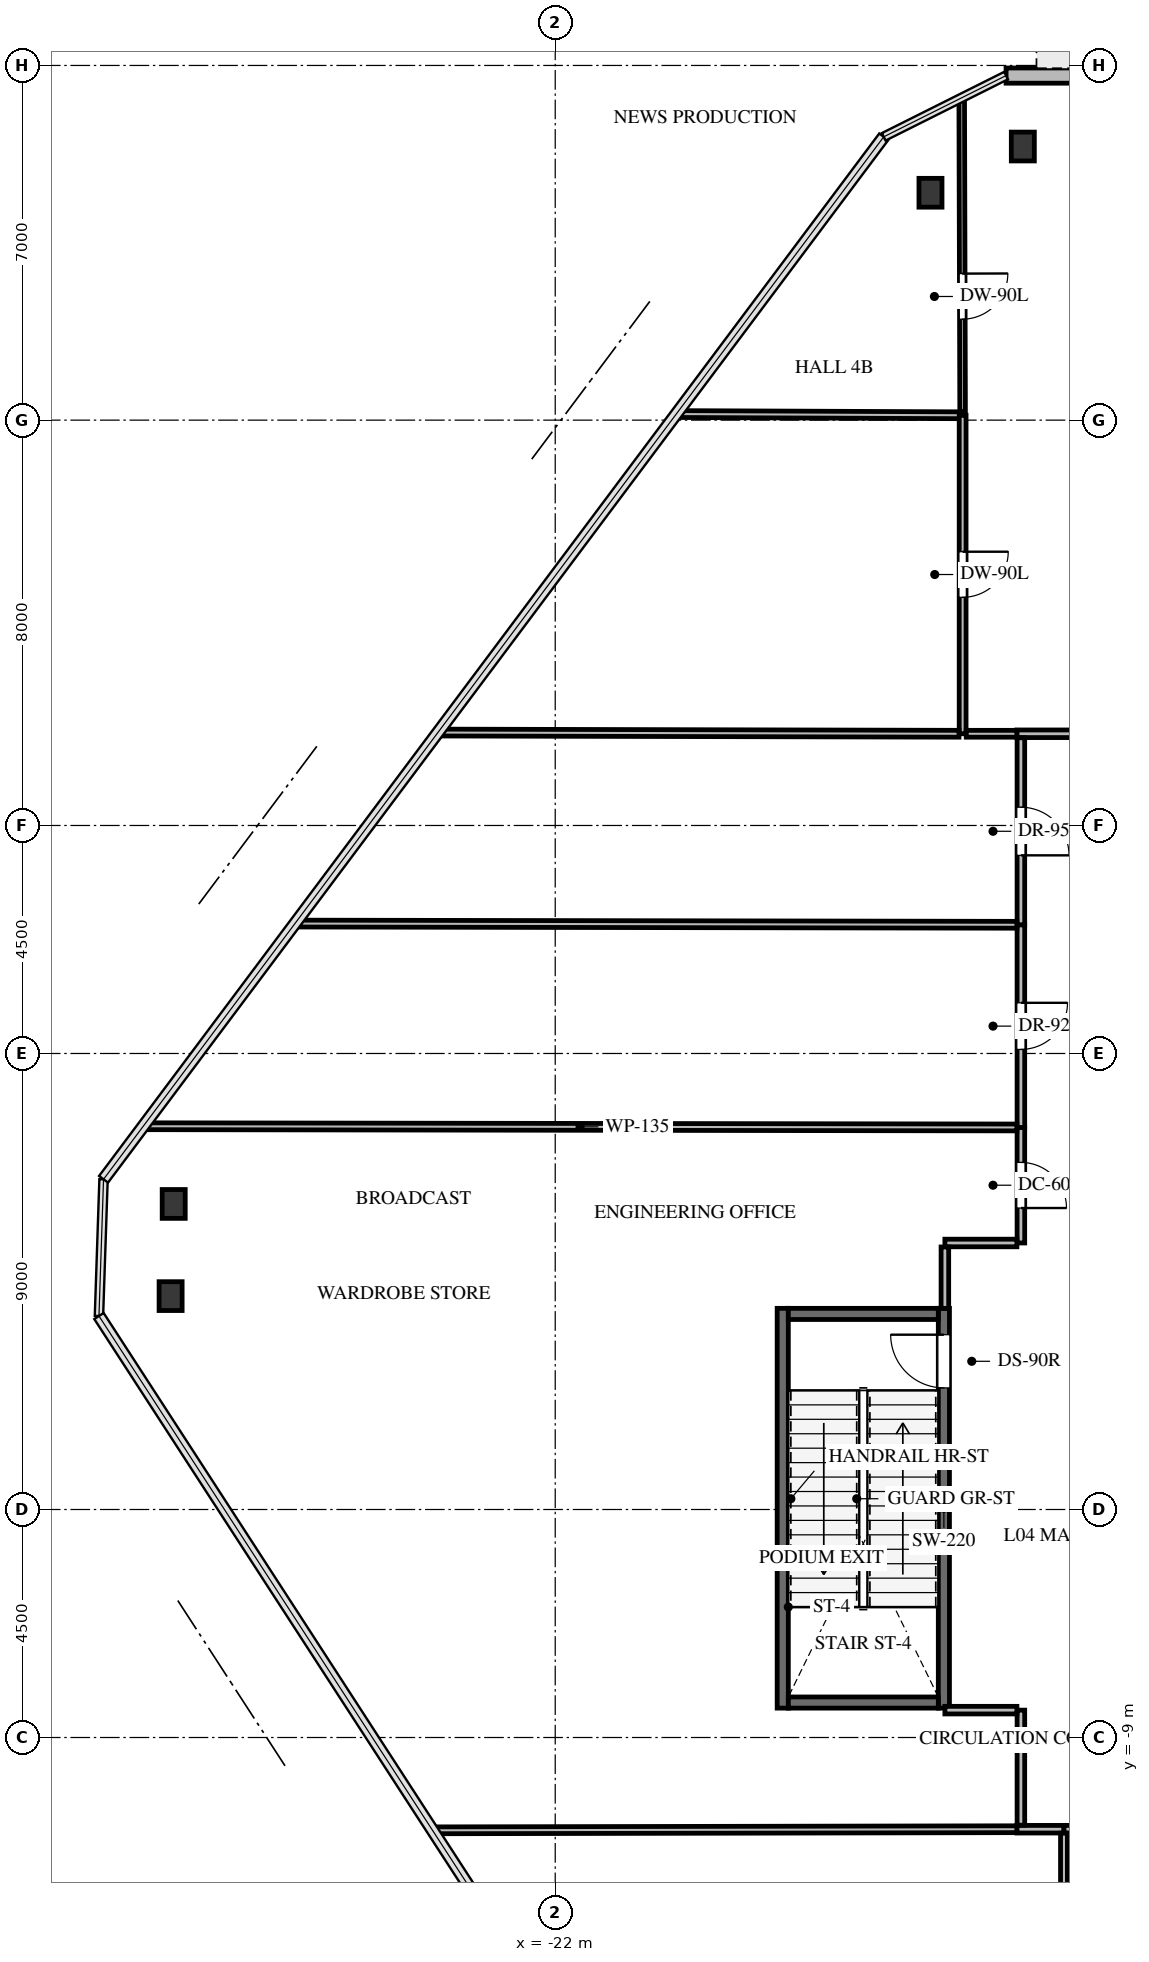
"""IFC4 building model, lengths in metres.
Left out: names, types, materials, properties, quantities, classifications, styles, units other than length and angle.
Written with IfcOpenShell. Run it as: python <this file> out.ifc"""

import sys

from ifc_helpers import new_model, si_unit, direction, frame, frame_2d, origin, origin_2d, place, context, subcontext, project, spatial, rectangle, i_section, extrude, source, transform, mapped, element, fill, save


model = new_model("IFC4")
c1 = context("Model", 3, precision=1e-05, world=origin(), true_north=direction((0.0, 1.0)))
c2 = subcontext(c1, "Body", "Model", "MODEL_VIEW")
j1 = project(units=[si_unit("LENGTHUNIT", "METRE"), si_unit("PLANEANGLEUNIT", "RADIAN")], contexts=[c1])
p1 = place(None, origin())
s1 = spatial("IfcSite", under=j1, at=p1, CompositionType="ELEMENT")
p2 = place(p1, origin())
s2 = spatial("IfcBuilding", under=s1, at=p2, CompositionType="ELEMENT")
p3 = place(p2, frame((0.0, 0.0, 21.2)))
s3 = spatial("IfcBuildingStorey", under=s2, at=p3, CompositionType="ELEMENT", Elevation=21.2)
p4 = place(p3, frame((-14.33, -8.42, -0.32), z_axis=(0.0, 0.0, 1.0), x_axis=(0.0, 1.0, 0.0)))
e1 = element("IfcWall", 1, at=p4, inside=s3, PredefinedType="SHEAR", context=c2, shape_type="SweptSolid", body=[
    extrude(rectangle(XDim=7.89, YDim=0.22, at=frame_2d((3.945, 0.0))), origin(), (0.0, 0.0, 1.0), 5.6),
])
p5 = place(p4, frame((6.32, 0.0, 0.0)))
e2 = element("IfcOpeningElement", 2, at=p5, cuts=e1, PredefinedType="OPENING", context=c2, shape_type="SweptSolid", body=[
    extrude(rectangle(XDim=1.05, YDim=2.15, at=frame_2d((0.525, 1.075))), frame((0.0, 0.12, 0.0), z_axis=(0.0, -1.0, 0.0), x_axis=(1.0, 0.0, 0.0)), (0.0, 0.0, 1.0), 0.24),
])
p6 = place(p3, frame((-17.51, -0.53, -0.32), z_axis=(0.0, 0.0, 1.0), x_axis=(0.0, -1.0, 0.0)))
e3 = element("IfcWall", 3, at=p6, inside=s3, PredefinedType="SHEAR", context=c2, shape_type="SweptSolid", body=[
    extrude(rectangle(XDim=7.89, YDim=0.22, at=frame_2d((3.945, 0.0))), origin(), (0.0, 0.0, 1.0), 5.6),
])
for number, where, z_axis, x_axis in (
    (4, (-17.4, -8.31, -0.32), (0.0, 0.0, 1.0), (1.0, 0.0, 0.0)),
    (5, (-14.44, -0.64, -0.32), (0.0, 0.0, 1.0), (-1.0, 0.0, 0.0)),
):
    element("IfcWall", number, at=place(p3, frame(where, z_axis=z_axis, x_axis=x_axis)), inside=s3, PredefinedType="SHEAR", context=c2, shape_type="SweptSolid", body=[
        extrude(rectangle(XDim=2.96, YDim=0.22, at=frame_2d((1.48, 0.0))), origin(), (0.0, 0.0, 1.0), 5.6),
    ])
m1 = source(origin(), c2, "Body", "SweptSolid", [
    extrude(i_section(OverallWidth=0.454, OverallDepth=0.569, WebThickness=0.078, FlangeThickness=0.125, FilletRadius=0.031, at=origin_2d()), origin(), (0.0, 0.0, 1.0), 5.6),
])
for number, where, z_axis, x_axis in (
    (6, (-29.591, -0.289, -0.32), (0.0, 0.0, 1.0), (1.0, 0.0, 0.0)),
    (7, (-29.529, 1.531, -0.32), (0.0, 0.0, 1.0), (1.0, 0.0, 0.0)),
    (8, (-14.594, 21.488, -0.32), (0.0, 0.0, 1.0), (1.0, 0.0, 0.0)),
    (9, (-12.772, 22.4, -0.32), (0.0, 0.0, 1.0), (1.0, 0.0, 0.0)),
):
    element("IfcColumn", number, at=place(p3, frame(where, z_axis=z_axis, x_axis=x_axis)), inside=s3, PredefinedType="COLUMN", context=c2, shape_type="MappedRepresentation", body=[
        mapped(m1, transform((0.0, 0.0, 0.0), x_axis=(1.0, 0.0, 0.0), y_axis=(0.0, 1.0, 0.0), z_axis=(0.0, 0.0, 1.0), scale=1.0)),
    ])
p7 = place(p3, frame((-13.103, 23.8, 0.0), z_axis=(0.0, 0.0, 1.0), x_axis=(1.0, 0.0, 0.0)))
e10 = element("IfcWall", 10, at=p7, inside=s3, PredefinedType="SOLIDWALL", context=c2, shape_type="SweptSolid", body=[
    extrude(rectangle(XDim=27.578, YDim=0.3, at=frame_2d((13.789, 0.0))), origin(), (0.0, 0.0, 1.0), 5.28),
])
p8 = place(p7, frame((3.0, 0.0, 1.0)))
e11 = element("IfcOpeningElement", 11, at=p8, cuts=e10, PredefinedType="OPENING", context=c2, shape_type="SweptSolid", body=[
    extrude(rectangle(XDim=1.8, YDim=2.1, at=frame_2d((0.9, 1.05))), frame((0.0, 0.16, 0.0), z_axis=(0.0, -1.0, 0.0), x_axis=(1.0, 0.0, 0.0)), (0.0, 0.0, 1.0), 0.32),
])
p9 = place(p7, frame((22.778, 0.0, 1.0)))
e12 = element("IfcOpeningElement", 12, at=p9, cuts=e10, PredefinedType="OPENING", context=c2, shape_type="SweptSolid", body=[
    extrude(rectangle(XDim=1.8, YDim=2.1, at=frame_2d((0.9, 1.05))), frame((0.0, 0.16, 0.0), z_axis=(0.0, -1.0, 0.0), x_axis=(1.0, 0.0, 0.0)), (0.0, 0.0, 1.0), 0.32),
])
p10 = place(p3, frame((-1.96, 10.81, 0.0), z_axis=(0.0, 0.0, 1.0), x_axis=(-1.0, 0.0, 0.0)))
e13 = element("IfcWall", 13, at=p10, inside=s3, PredefinedType="PARTITIONING", context=c2, shape_type="SweptSolid", body=[
    extrude(rectangle(XDim=10.93, YDim=0.15, at=frame_2d((5.465, 0.0))), origin(), (0.0, 0.0, 1.0), 4.285),
])
p11 = place(p10, frame((5.005, 0.0, 0.0)))
e14 = element("IfcOpeningElement", 14, at=p11, cuts=e13, PredefinedType="OPENING", context=c2, shape_type="SweptSolid", body=[
    extrude(rectangle(XDim=0.92, YDim=2.1, at=frame_2d((0.46, 1.05))), frame((0.0, 0.085, 0.0), z_axis=(0.0, -1.0, 0.0), x_axis=(1.0, 0.0, 0.0)), (0.0, 0.0, 1.0), 0.17),
])
p12 = place(p3, frame((-12.89, -10.81, 0.0), z_axis=(0.0, 0.0, 1.0), x_axis=(1.0, 0.0, 0.0)))
e15 = element("IfcWall", 15, at=p12, inside=s3, PredefinedType="PARTITIONING", context=c2, shape_type="SweptSolid", body=[
    extrude(rectangle(XDim=0.93, YDim=0.15, at=frame_2d((0.465, 0.0))), origin(), (0.0, 0.0, 1.0), 4.285),
])
p13 = place(p3, frame((-11.96, -10.81, 0.0), z_axis=(0.0, 0.0, 1.0), x_axis=(1.0, 0.0, 0.0)))
e16 = element("IfcWall", 16, at=p13, inside=s3, PredefinedType="PARTITIONING", context=c2, shape_type="SweptSolid", body=[
    extrude(rectangle(XDim=12.0, YDim=0.15, at=frame_2d((6.0, 0.0))), origin(), (0.0, 0.0, 1.0), 4.285),
])
p14 = place(p13, frame((5.54, 0.0, 0.0)))
e17 = element("IfcOpeningElement", 17, at=p14, cuts=e16, PredefinedType="OPENING", context=c2, shape_type="SweptSolid", body=[
    extrude(rectangle(XDim=0.92, YDim=2.1, at=frame_2d((0.46, 1.05))), frame((0.0, 0.085, 0.0), z_axis=(0.0, -1.0, 0.0), x_axis=(1.0, 0.0, 0.0)), (0.0, 0.0, 1.0), 0.17),
])
p15 = place(p3, frame((-12.81, -8.46, 0.0), z_axis=(0.0, 0.0, 1.0), x_axis=(0.0, -1.0, 0.0)))
e18 = element("IfcWall", 18, at=p15, inside=s3, PredefinedType="PARTITIONING", context=c2, shape_type="SweptSolid", body=[
    extrude(rectangle(XDim=2.271, YDim=0.15, at=frame_2d((1.135, 0.0))), origin(), (0.0, 0.0, 1.0), 5.265),
])
p16 = place(p3, frame((-12.81, 3.04, 0.0), z_axis=(0.0, 0.0, 1.0), x_axis=(0.0, -1.0, 0.0)))
e19 = element("IfcWall", 19, at=p16, inside=s3, PredefinedType="PARTITIONING", context=c2, shape_type="SweptSolid", body=[
    extrude(rectangle(XDim=2.28, YDim=0.15, at=frame_2d((1.14, 0.0))), origin(), (0.0, 0.0, 1.0), 4.285),
])
p17 = place(p16, frame((0.69, 0.0, 0.0)))
e20 = element("IfcOpeningElement", 20, at=p17, cuts=e19, PredefinedType="OPENING", context=c2, shape_type="SweptSolid", body=[
    extrude(rectangle(XDim=0.9, YDim=2.05, at=frame_2d((0.45, 1.025))), frame((0.0, 0.085, 0.0), z_axis=(0.0, -1.0, 0.0), x_axis=(1.0, 0.0, 0.0)), (0.0, 0.0, 1.0), 0.17),
])
for number, where, z_axis, x_axis in (
    (21, (-12.889, 0.76, 0.0), (0.0, 0.0, 1.0), (-1.0, 0.0, 0.0)),
    (22, (-14.31, -8.46, 0.0), (0.0, 0.0, 1.0), (1.0, 0.0, 0.0)),
):
    element("IfcWall", number, at=place(p3, frame(where, z_axis=z_axis, x_axis=x_axis)), inside=s3, PredefinedType="PARTITIONING", context=c2, shape_type="SweptSolid", body=[
        extrude(rectangle(XDim=1.421, YDim=0.15, at=frame_2d((0.71, 0.0))), origin(), (0.0, 0.0, 1.0), 5.265),
    ])
p18 = place(p3, frame((-14.31, 0.681, 0.0), z_axis=(0.0, 0.0, 1.0), x_axis=(0.0, -1.0, 0.0)))
e23 = element("IfcWall", 23, at=p18, inside=s3, PredefinedType="PARTITIONING", context=c2, shape_type="SweptSolid", body=[
    extrude(rectangle(XDim=1.211, YDim=0.15, at=frame_2d((0.605, 0.0))), origin(), (0.0, 0.0, 1.0), 5.265),
])
p19 = place(p3, frame((-12.81, 7.04, 0.0), z_axis=(0.0, 0.0, 1.0), x_axis=(0.0, -1.0, 0.0)))
e24 = element("IfcWall", 24, at=p19, inside=s3, PredefinedType="PARTITIONING", context=c2, shape_type="SweptSolid", body=[
    extrude(rectangle(XDim=4.0, YDim=0.15, at=frame_2d((2.0, 0.0))), origin(), (0.0, 0.0, 1.0), 5.265),
])
p20 = place(p19, frame((1.54, 0.0, 0.0)))
e25 = element("IfcOpeningElement", 25, at=p20, cuts=e24, PredefinedType="OPENING", context=c2, shape_type="SweptSolid", body=[
    extrude(rectangle(XDim=0.92, YDim=2.1, at=frame_2d((0.46, 1.05))), frame((0.0, 0.085, 0.0), z_axis=(0.0, -1.0, 0.0), x_axis=(1.0, 0.0, 0.0)), (0.0, 0.0, 1.0), 0.17),
])
p21 = place(p3, frame((-12.81, 10.731, 0.0), z_axis=(0.0, 0.0, 1.0), x_axis=(0.0, -1.0, 0.0)))
e26 = element("IfcWall", 26, at=p21, inside=s3, PredefinedType="PARTITIONING", context=c2, shape_type="SweptSolid", body=[
    extrude(rectangle(XDim=3.691, YDim=0.15, at=frame_2d((1.845, 0.0))), origin(), (0.0, 0.0, 1.0), 5.265),
])
p22 = place(p21, frame((1.371, 0.0, 0.0)))
e27 = element("IfcOpeningElement", 27, at=p22, cuts=e26, PredefinedType="OPENING", context=c2, shape_type="SweptSolid", body=[
    extrude(rectangle(XDim=0.95, YDim=2.1, at=frame_2d((0.475, 1.05))), frame((0.0, 0.085, 0.0), z_axis=(0.0, -1.0, 0.0), x_axis=(1.0, 0.0, 0.0)), (0.0, 0.0, 1.0), 0.17),
])
p23 = place(p3, frame((-19.612, 17.12, 0.0), z_axis=(0.0, 0.0, 1.0), x_axis=(0.999990855289, -0.004276603511, 0.0)))
e28 = element("IfcWall", 28, at=p23, inside=s3, PredefinedType="PARTITIONING", context=c2, shape_type="SweptSolid", body=[
    extrude(rectangle(XDim=5.652, YDim=0.135, at=frame_2d((2.826, 0.0))), origin(), (0.0, 0.0, 1.0), 4.574),
])
p24 = place(p3, frame((-13.96, 17.096, 0.0), z_axis=(0.0, 0.0, 1.0), x_axis=(0.0, -1.0, 0.0)))
e29 = element("IfcWall", 29, at=p24, inside=s3, PredefinedType="PARTITIONING", context=c2, shape_type="SweptSolid", body=[
    extrude(rectangle(XDim=6.286, YDim=0.135, at=frame_2d((3.143, 0.0))), origin(), (0.0, 0.0, 1.0), 5.265),
])
p25 = place(p24, frame((2.693, 0.0, 0.0)))
e30 = element("IfcOpeningElement", 30, at=p25, cuts=e29, PredefinedType="OPENING", context=c2, shape_type="SweptSolid", body=[
    extrude(rectangle(XDim=0.9, YDim=2.05, at=frame_2d((0.45, 1.025))), frame((0.0, 0.078, 0.0), z_axis=(0.0, -1.0, 0.0), x_axis=(1.0, 0.0, 0.0)), (0.0, 0.0, 1.0), 0.155),
])
p26 = place(p3, frame((-14.031, 10.81, 0.0), z_axis=(0.0, 0.0, 1.0), x_axis=(-0.999997348739, 0.002302719182, 0.0)))
e31 = element("IfcWall", 31, at=p26, inside=s3, PredefinedType="PARTITIONING", context=c2, shape_type="SweptSolid", body=[
    extrude(rectangle(XDim=10.284, YDim=0.135, at=frame_2d((5.142, 0.0))), origin(), (0.0, 0.0, 1.0), 4.574),
])
p27 = place(p3, frame((-13.978, 23.362, 0.0), z_axis=(0.0, 0.0, 1.0), x_axis=(0.002798349441, -0.999996084613, 0.0)))
e32 = element("IfcWall", 32, at=p27, inside=s3, PredefinedType="MOVABLE", context=c2, shape_type="SweptSolid", body=[
    extrude(rectangle(XDim=6.194, YDim=0.11, at=frame_2d((3.097, 0.0))), origin(), (0.0, 0.0, 1.0), 4.285),
])
p28 = place(p27, frame((3.47, 0.0, 0.0)))
e33 = element("IfcOpeningElement", 33, at=p28, cuts=e32, PredefinedType="OPENING", context=c2, shape_type="SweptSolid", body=[
    extrude(rectangle(XDim=0.9, YDim=2.05, at=frame_2d((0.45, 1.025))), frame((0.0, 0.065, 0.0), z_axis=(0.0, -1.0, 0.0), x_axis=(1.0, 0.0, 0.0)), (0.0, 0.0, 1.0), 0.13),
])
p29 = place(p3, frame((-12.89, 10.81, 0.0), z_axis=(0.0, 0.0, 1.0), x_axis=(-1.0, 0.0, 0.0)))
e34 = element("IfcWall", 34, at=p29, inside=s3, PredefinedType="PARTITIONING", context=c2, shape_type="SweptSolid", body=[
    extrude(rectangle(XDim=0.999, YDim=0.135, at=frame_2d((0.499, 0.0))), origin(), (0.0, 0.0, 1.0), 5.265),
])
p30 = place(p3, frame((-11.96, -10.889, 0.0), z_axis=(0.0, 0.0, 1.0), x_axis=(0.0, -1.0, 0.0)))
e35 = element("IfcWall", 35, at=p30, inside=s3, PredefinedType="PARTITIONING", context=c2, shape_type="SweptSolid", body=[
    extrude(rectangle(XDim=12.756, YDim=0.135, at=frame_2d((6.378, 0.0))), origin(), (0.0, 0.0, 1.0), 4.285),
])
p31 = place(p30, frame((5.928, 0.0, 0.0)))
e36 = element("IfcOpeningElement", 36, at=p31, cuts=e35, PredefinedType="OPENING", context=c2, shape_type="SweptSolid", body=[
    extrude(rectangle(XDim=0.9, YDim=2.05, at=frame_2d((0.45, 1.025))), frame((0.0, 0.078, 0.0), z_axis=(0.0, -1.0, 0.0), x_axis=(1.0, 0.0, 0.0)), (0.0, 0.0, 1.0), 0.155),
])
p32 = place(p3, frame((-24.422, -10.832, 0.0), z_axis=(0.0, 0.0, 1.0), x_axis=(0.999998264499, 0.001863061508, 0.0)))
e37 = element("IfcWall", 37, at=p32, inside=s3, PredefinedType="PARTITIONING", context=c2, shape_type="SweptSolid", body=[
    extrude(rectangle(XDim=11.532, YDim=0.135, at=frame_2d((5.766, 0.0))), origin(), (0.0, 0.0, 1.0), 4.574),
])
p33 = place(p3, frame((-30.131, 3.064, 0.0), z_axis=(0.0, 0.0, 1.0), x_axis=(0.999999037188, -0.001387668229, 0.0)))
e38 = element("IfcWall", 38, at=p33, inside=s3, PredefinedType="PARTITIONING", context=c2, shape_type="SweptSolid", body=[
    extrude(rectangle(XDim=17.242, YDim=0.135, at=frame_2d((8.621, 0.0))), origin(), (0.0, 0.0, 1.0), 4.574),
])
p34 = place(p3, frame((-27.137, 7.064, 0.0), z_axis=(0.0, 0.0, 1.0), x_axis=(0.999998590092, -0.001679229983, 0.0)))
e39 = element("IfcWall", 39, at=p34, inside=s3, PredefinedType="PARTITIONING", context=c2, shape_type="SweptSolid", body=[
    extrude(rectangle(XDim=14.248, YDim=0.135, at=frame_2d((7.124, 0.0))), origin(), (0.0, 0.0, 1.0), 4.574),
])
m2 = source(origin(), c2, "Body", "SweptSolid", [
    extrude(rectangle(XDim=1.05, YDim=2.15, at=frame_2d((0.525, 1.075))), frame((0.0, 0.025, 0.0), z_axis=(0.0, -1.0, 0.0), x_axis=(1.0, 0.0, 0.0)), (0.0, 0.0, 1.0), 0.05),
])
p35 = place(p5, origin())
e40 = element("IfcDoor", 40, at=p35, inside=s3, OperationType="SINGLE_SWING_RIGHT", PredefinedType="DOOR", context=c2, shape_type="MappedRepresentation", body=[
    mapped(m2, transform((0.0, 0.0, 0.0), x_axis=(1.0, 0.0, 0.0), y_axis=(0.0, 1.0, 0.0), z_axis=(0.0, 0.0, 1.0), scale=1.0)),
])
fill(e2, e40)
m3 = source(origin(), c2, "Body", "SweptSolid", [
    extrude(rectangle(XDim=0.9, YDim=2.05, at=frame_2d((0.45, 1.025))), frame((0.0, 0.025, 0.0), z_axis=(0.0, -1.0, 0.0), x_axis=(1.0, 0.0, 0.0)), (0.0, 0.0, 1.0), 0.05),
])
p36 = place(p17, origin())
e41 = element("IfcDoor", 41, at=p36, inside=s3, OperationType="SINGLE_SWING_RIGHT", PredefinedType="DOOR", context=c2, shape_type="MappedRepresentation", body=[
    mapped(m3, transform((0.0, 0.0, 0.0), x_axis=(1.0, 0.0, 0.0), y_axis=(0.0, 1.0, 0.0), z_axis=(0.0, 0.0, 1.0), scale=1.0)),
])
fill(e20, e41)
m4 = source(origin(), c2, "Body", "SweptSolid", [
    extrude(rectangle(XDim=0.92, YDim=2.1, at=frame_2d((0.46, 1.05))), frame((0.0, 0.025, 0.0), z_axis=(0.0, -1.0, 0.0), x_axis=(1.0, 0.0, 0.0)), (0.0, 0.0, 1.0), 0.05),
])
p37 = place(p20, origin())
e42 = element("IfcDoor", 42, at=p37, inside=s3, OperationType="SINGLE_SWING_LEFT", PredefinedType="DOOR", context=c2, shape_type="MappedRepresentation", body=[
    mapped(m4, transform((0.0, 0.0, 0.0), x_axis=(1.0, 0.0, 0.0), y_axis=(0.0, 1.0, 0.0), z_axis=(0.0, 0.0, 1.0), scale=1.0)),
])
fill(e25, e42)
m5 = source(origin(), c2, "Body", "SweptSolid", [
    extrude(rectangle(XDim=0.95, YDim=2.1, at=frame_2d((0.475, 1.05))), frame((0.0, 0.025, 0.0), z_axis=(0.0, -1.0, 0.0), x_axis=(1.0, 0.0, 0.0)), (0.0, 0.0, 1.0), 0.05),
])
p38 = place(p22, origin())
e43 = element("IfcDoor", 43, at=p38, inside=s3, OperationType="SINGLE_SWING_RIGHT", PredefinedType="DOOR", context=c2, shape_type="MappedRepresentation", body=[
    mapped(m5, transform((0.0, 0.0, 0.0), x_axis=(1.0, 0.0, 0.0), y_axis=(0.0, 1.0, 0.0), z_axis=(0.0, 0.0, 1.0), scale=1.0)),
])
fill(e27, e43)
m6 = source(origin(), c2, "Body", "SweptSolid", [
    extrude(rectangle(XDim=0.9, YDim=2.05, at=frame_2d((0.45, 1.025))), frame((0.0, 0.025, 0.0), z_axis=(0.0, -1.0, 0.0), x_axis=(1.0, 0.0, 0.0)), (0.0, 0.0, 1.0), 0.05),
])
p39 = place(p25, origin())
e44 = element("IfcDoor", 44, at=p39, inside=s3, OperationType="SINGLE_SWING_LEFT", PredefinedType="DOOR", context=c2, shape_type="MappedRepresentation", body=[
    mapped(m6, transform((0.0, 0.0, 0.0), x_axis=(1.0, 0.0, 0.0), y_axis=(0.0, 1.0, 0.0), z_axis=(0.0, 0.0, 1.0), scale=1.0)),
])
fill(e30, e44)
p40 = place(p28, origin())
e45 = element("IfcDoor", 45, at=p40, inside=s3, OperationType="SINGLE_SWING_LEFT", PredefinedType="DOOR", context=c2, shape_type="MappedRepresentation", body=[
    mapped(m6, transform((0.0, 0.0, 0.0), x_axis=(1.0, 0.0, 0.0), y_axis=(0.0, 1.0, 0.0), z_axis=(0.0, 0.0, 1.0), scale=1.0)),
])
fill(e33, e45)
save(model, sys.argv[1])
